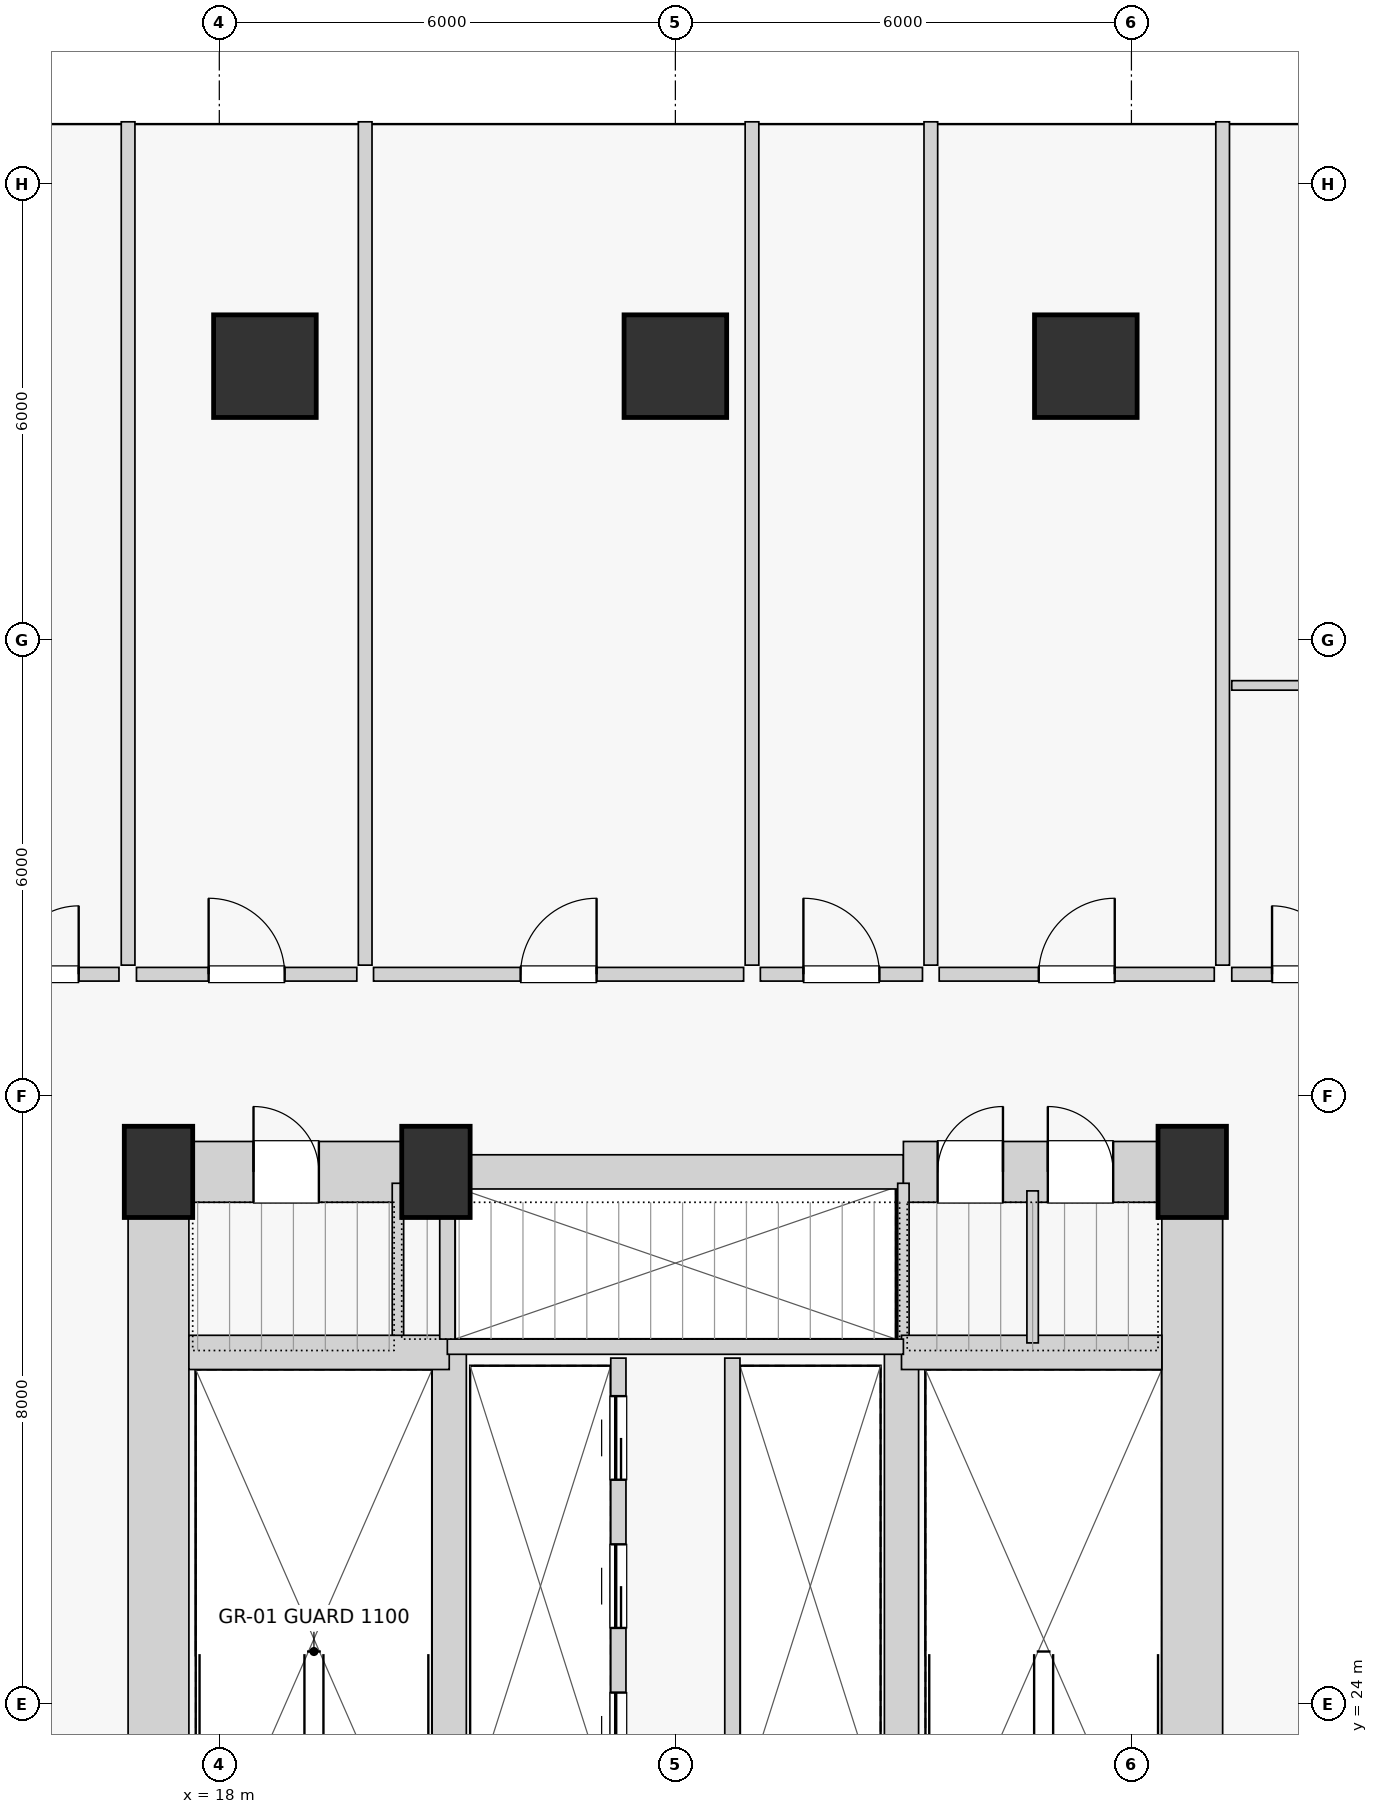
"""IFC4 building model, lengths in metres.
Left out: names, types, materials, properties, quantities, classifications, styles, units other than length and angle.
Written with IfcOpenShell. Run it as: python <this file> out.ifc"""

import sys

from ifc_helpers import new_model, si_unit, direction, frame, frame_2d, origin, origin_2d, place, context, subcontext, project, spatial, rectangle, extrude, source, transform, mapped, element, fill, save


model = new_model("IFC4")
c1 = context("Model", 3, precision=1e-05, world=origin(), true_north=direction((0.0, 1.0)))
c2 = subcontext(c1, "Body", "Model", "MODEL_VIEW")
j1 = project(units=[si_unit("LENGTHUNIT", "METRE"), si_unit("PLANEANGLEUNIT", "RADIAN")], contexts=[c1])
p1 = place(None, origin())
s1 = spatial("IfcSite", under=j1, at=p1, CompositionType="ELEMENT")
p2 = place(p1, origin())
s2 = spatial("IfcBuilding", under=s1, at=p2, CompositionType="ELEMENT")
p3 = place(p2, frame((0.0, 0.0, 22.8)))
s3 = spatial("IfcBuildingStorey", under=s2, at=p3, CompositionType="ELEMENT", Elevation=22.8)
for number, where, z_axis, x_axis in (
    (1, (17.2, 31.0, 0.0), (0.0, 0.0, 1.0), (1.0, 0.0, 0.0)),
    (2, (20.85, 31.0, 0.0), (0.0, 0.0, 1.0), (1.0, 0.0, 0.0)),
    (3, (30.8, 31.0, 0.0), (0.0, 0.0, 1.0), (1.0, 0.0, 0.0)),
):
    element("IfcColumn", number, at=place(p3, frame(where, z_axis=z_axis, x_axis=x_axis)), inside=s3, PredefinedType="PILASTER", context=c2, shape_type="SweptSolid", body=[
        extrude(rectangle(XDim=0.9, YDim=1.2, at=origin_2d()), origin(), (0.0, 0.0, 1.0), 4.5),
    ])
p4 = place(p3, frame((29.4, 41.6, 0.0), z_axis=(0.0, 0.0, 1.0), x_axis=(1.0, 0.0, 0.0)))
e4 = element("IfcColumn", 4, at=p4, inside=s3, PredefinedType="COLUMN", context=c2, shape_type="SweptSolid", body=[
    extrude(rectangle(XDim=1.35, YDim=1.35, at=origin_2d()), origin(), (0.0, 0.0, 1.0), 4.5),
])
p5 = place(p3, frame((24.0, 41.6, -0.35), z_axis=(0.0, 0.0, 1.0), x_axis=(1.0, 0.0, 0.0)))
e5 = element("IfcColumn", 5, at=p5, inside=s3, PredefinedType="COLUMN", context=c2, shape_type="SweptSolid", body=[
    extrude(rectangle(XDim=1.35, YDim=1.35, at=origin_2d()), origin(), (0.0, 0.0, 1.0), 4.85),
])
p6 = place(p3, frame((18.6, 41.6, 0.0), z_axis=(0.0, 0.0, 1.0), x_axis=(1.0, 0.0, 0.0)))
e6 = element("IfcColumn", 6, at=p6, inside=s3, PredefinedType="COLUMN", context=c2, shape_type="SweptSolid", body=[
    extrude(rectangle(XDim=1.35, YDim=1.35, at=origin_2d()), origin(), (0.0, 0.0, 1.0), 4.5),
])
for number, where, z_axis, x_axis in (
    (7, (17.2, 16.8, 0.0), (0.0, 0.0, 1.0), (0.0, 1.0, 0.0)),
    (8, (30.8, 16.8, 0.0), (0.0, 0.0, 1.0), (0.0, 1.0, 0.0)),
):
    element("IfcWall", number, at=place(p3, frame(where, z_axis=z_axis, x_axis=x_axis)), inside=s3, PredefinedType="SHEAR", context=c2, shape_type="SweptSolid", body=[
        extrude(rectangle(XDim=14.2, YDim=0.8, at=frame_2d((7.1, 0.0))), origin(), (0.0, 0.0, 1.0), 4.25),
    ])
p7 = place(p3, frame((17.2, 31.0, 0.0), z_axis=(0.0, 0.0, 1.0), x_axis=(1.0, 0.0, 0.0)))
e9 = element("IfcWall", 9, at=p7, inside=s3, PredefinedType="SHEAR", context=c2, shape_type="SweptSolid", body=[
    extrude(rectangle(XDim=3.8, YDim=0.8, at=frame_2d((1.9, 0.0))), origin(), (0.0, 0.0, 1.0), 4.25),
])
p8 = place(p7, frame((1.25, 0.0, 0.0)))
e10 = element("IfcOpeningElement", 10, at=p8, cuts=e9, PredefinedType="OPENING", context=c2, shape_type="SweptSolid", body=[
    extrude(rectangle(XDim=0.86, YDim=2.01, at=frame_2d((0.43, 1.005))), frame((0.0, 0.41, 0.0), z_axis=(0.0, -1.0, 0.0), x_axis=(1.0, 0.0, 0.0)), (0.0, 0.0, 1.0), 0.82),
])
p9 = place(p3, frame((21.0, 31.0, 0.0), z_axis=(0.0, 0.0, 1.0), x_axis=(1.0, 0.0, 0.0)))
e11 = element("IfcWall", 11, at=p9, inside=s3, PredefinedType="SHEAR", context=c2, shape_type="SweptSolid", body=[
    extrude(rectangle(XDim=6.0, YDim=0.45, at=frame_2d((3.0, 0.0))), origin(), (0.0, 0.0, 1.0), 4.25),
])
p10 = place(p3, frame((27.0, 31.0, 0.0), z_axis=(0.0, 0.0, 1.0), x_axis=(1.0, 0.0, 0.0)))
e12 = element("IfcWall", 12, at=p10, inside=s3, PredefinedType="SHEAR", context=c2, shape_type="SweptSolid", body=[
    extrude(rectangle(XDim=3.8, YDim=0.8, at=frame_2d((1.9, 0.0))), origin(), (0.0, 0.0, 1.0), 4.25),
])
p11 = place(p10, frame((0.45, 0.0, 0.0)))
e13 = element("IfcOpeningElement", 13, at=p11, cuts=e12, PredefinedType="OPENING", context=c2, shape_type="SweptSolid", body=[
    extrude(rectangle(XDim=0.86, YDim=2.01, at=frame_2d((0.43, 1.005))), frame((0.0, 0.41, 0.0), z_axis=(0.0, -1.0, 0.0), x_axis=(1.0, 0.0, 0.0)), (0.0, 0.0, 1.0), 0.82),
])
p12 = place(p10, frame((1.9, 0.0, 0.0)))
e14 = element("IfcOpeningElement", 14, at=p12, cuts=e12, PredefinedType="OPENING", context=c2, shape_type="SweptSolid", body=[
    extrude(rectangle(XDim=0.86, YDim=2.01, at=frame_2d((0.43, 1.005))), frame((0.0, 0.41, 0.0), z_axis=(0.0, -1.0, 0.0), x_axis=(1.0, 0.0, 0.0)), (0.0, 0.0, 1.0), 0.82),
])
for number, where, z_axis, x_axis in (
    (15, (20.35, 28.65, 0.0), (0.0, 0.0, 1.0), (0.0, 1.0, 0.0)),
    (16, (27.0, 28.65, 0.0), (0.0, 0.0, 1.0), (0.0, 1.0, 0.0)),
):
    element("IfcWall", number, at=place(p3, frame(where, z_axis=z_axis, x_axis=x_axis)), inside=s3, PredefinedType="PARTITIONING", context=c2, shape_type="SweptSolid", body=[
        extrude(rectangle(XDim=2.2, YDim=0.15, at=frame_2d((1.1, 0.0))), origin(), (0.0, 0.0, 1.0), 4.25),
    ])
for number, where, z_axis, x_axis in (
    (17, (21.025, 19.8, 0.0), (0.0, 0.0, 1.0), (0.0, 1.0, 0.0)),
    (18, (26.975, 19.8, 0.0), (0.0, 0.0, 1.0), (0.0, 1.0, 0.0)),
):
    element("IfcWall", number, at=place(p3, frame(where, z_axis=z_axis, x_axis=x_axis)), inside=s3, PredefinedType="SHEAR", context=c2, shape_type="SweptSolid", body=[
        extrude(rectangle(XDim=8.825, YDim=0.45, at=frame_2d((4.413, 0.0))), origin(), (0.0, 0.0, 1.0), 4.25),
    ])
for number, where, z_axis, x_axis in (
    (19, (17.6, 28.625, 0.0), (0.0, 0.0, 1.0), (1.0, 0.0, 0.0)),
    (20, (26.975, 28.625, 0.0), (0.0, 0.0, 1.0), (1.0, 0.0, 0.0)),
):
    element("IfcWall", number, at=place(p3, frame(where, z_axis=z_axis, x_axis=x_axis)), inside=s3, PredefinedType="SHEAR", context=c2, shape_type="SweptSolid", body=[
        extrude(rectangle(XDim=3.425, YDim=0.45, at=frame_2d((1.712, 0.0))), origin(), (0.0, 0.0, 1.0), 4.25),
    ])
p13 = place(p3, frame((21.0, 28.7, 0.0), z_axis=(0.0, 0.0, 1.0), x_axis=(1.0, 0.0, 0.0)))
e21 = element("IfcWall", 21, at=p13, inside=s3, PredefinedType="SOLIDWALL", context=c2, shape_type="SweptSolid", body=[
    extrude(rectangle(XDim=6.0, YDim=0.2, at=frame_2d((3.0, 0.0))), origin(), (0.0, 0.0, 1.0), 4.25),
])
p14 = place(p3, frame((21.0, 28.8, 0.0), z_axis=(0.0, 0.0, 1.0), x_axis=(0.0, 1.0, 0.0)))
e22 = element("IfcWall", 22, at=p14, inside=s3, PredefinedType="SOLIDWALL", context=c2, shape_type="SweptSolid", body=[
    extrude(rectangle(XDim=1.6, YDim=0.2, at=frame_2d((0.8, 0.0))), origin(), (0.0, 0.0, 1.0), 4.25),
])
p15 = place(p3, frame((23.25, 22.6, 0.0), z_axis=(0.0, 0.0, 1.0), x_axis=(0.0, 1.0, 0.0)))
e23 = element("IfcWall", 23, at=p15, inside=s3, PredefinedType="SOLIDWALL", context=c2, shape_type="SweptSolid", body=[
    extrude(rectangle(XDim=5.95, YDim=0.2, at=frame_2d((2.975, 0.0))), origin(), (0.0, 0.0, 1.0), 4.25),
])
p16 = place(p15, frame((0.45, 0.0, 0.0)))
e24 = element("IfcOpeningElement", 24, at=p16, cuts=e23, PredefinedType="OPENING", context=c2, shape_type="SweptSolid", body=[
    extrude(rectangle(XDim=1.1, YDim=2.08, at=frame_2d((0.55, 1.04))), frame((0.0, 0.11, 0.0), z_axis=(0.0, -1.0, 0.0), x_axis=(1.0, 0.0, 0.0)), (0.0, 0.0, 1.0), 0.22),
])
p17 = place(p15, frame((2.4, 0.0, 0.0)))
e25 = element("IfcOpeningElement", 25, at=p17, cuts=e23, PredefinedType="OPENING", context=c2, shape_type="SweptSolid", body=[
    extrude(rectangle(XDim=1.1, YDim=2.08, at=frame_2d((0.55, 1.04))), frame((0.0, 0.11, 0.0), z_axis=(0.0, -1.0, 0.0), x_axis=(1.0, 0.0, 0.0)), (0.0, 0.0, 1.0), 0.22),
])
p18 = place(p15, frame((4.35, 0.0, 0.0)))
e26 = element("IfcOpeningElement", 26, at=p18, cuts=e23, PredefinedType="OPENING", context=c2, shape_type="SweptSolid", body=[
    extrude(rectangle(XDim=1.1, YDim=2.08, at=frame_2d((0.55, 1.04))), frame((0.0, 0.11, 0.0), z_axis=(0.0, -1.0, 0.0), x_axis=(1.0, 0.0, 0.0)), (0.0, 0.0, 1.0), 0.22),
])
p19 = place(p3, frame((24.75, 22.6, 0.0), z_axis=(0.0, 0.0, 1.0), x_axis=(0.0, 1.0, 0.0)))
e27 = element("IfcWall", 27, at=p19, inside=s3, PredefinedType="SOLIDWALL", context=c2, shape_type="SweptSolid", body=[
    extrude(rectangle(XDim=5.95, YDim=0.2, at=frame_2d((2.975, 0.0))), origin(), (0.0, 0.0, 1.0), 4.25),
])
p20 = place(p3, frame((28.7, 28.75, 0.0), z_axis=(0.0, 0.0, 1.0), x_axis=(0.0, 1.0, 0.0)))
e28 = element("IfcWall", 28, at=p20, inside=s3, PredefinedType="PARTITIONING", context=c2, shape_type="SweptSolid", body=[
    extrude(rectangle(XDim=2.0, YDim=0.15, at=frame_2d((1.0, 0.0))), origin(), (0.0, 0.0, 1.0), 4.25),
])
for number, where, z_axis, x_axis in (
    (29, (16.8, 33.72, 0.0), (0.0, 0.0, 1.0), (0.0, 1.0, 0.0)),
    (30, (31.2, 33.72, 0.0), (0.0, 0.0, 1.0), (0.0, 1.0, 0.0)),
):
    element("IfcWall", number, at=place(p3, frame(where, z_axis=z_axis, x_axis=x_axis)), inside=s3, PredefinedType="PARTITIONING", context=c2, shape_type="SweptSolid", body=[
        extrude(rectangle(XDim=11.095, YDim=0.18, at=frame_2d((5.547, 0.0))), origin(), (0.0, 0.0, 1.0), 4.25),
    ])
p21 = place(p3, frame((16.91, 33.6, 0.0), z_axis=(0.0, 0.0, 1.0), x_axis=(1.0, 0.0, 0.0)))
e31 = element("IfcWall", 31, at=p21, inside=s3, PredefinedType="PARTITIONING", context=c2, shape_type="SweptSolid", body=[
    extrude(rectangle(XDim=2.899, YDim=0.18, at=frame_2d((1.45, 0.0))), origin(), (0.0, 0.0, 1.0), 4.25),
])
p22 = place(p21, frame((0.949, 0.0, 0.0)))
e32 = element("IfcOpeningElement", 32, at=p22, cuts=e31, PredefinedType="OPENING", context=c2, shape_type="SweptSolid", body=[
    extrude(rectangle(XDim=1.0, YDim=2.01, at=frame_2d((0.5, 1.005))), frame((0.0, 0.1, 0.0), z_axis=(0.0, -1.0, 0.0), x_axis=(1.0, 0.0, 0.0)), (0.0, 0.0, 1.0), 0.2),
])
p23 = place(p3, frame((20.029, 33.6, 0.0), z_axis=(0.0, 0.0, 1.0), x_axis=(1.0, 0.0, 0.0)))
e33 = element("IfcWall", 33, at=p23, inside=s3, PredefinedType="PARTITIONING", context=c2, shape_type="SweptSolid", body=[
    extrude(rectangle(XDim=4.869, YDim=0.18, at=frame_2d((2.435, 0.0))), origin(), (0.0, 0.0, 1.0), 4.25),
])
p24 = place(p23, frame((1.935, 0.0, 0.0)))
e34 = element("IfcOpeningElement", 34, at=p24, cuts=e33, PredefinedType="OPENING", context=c2, shape_type="SweptSolid", body=[
    extrude(rectangle(XDim=1.0, YDim=2.01, at=frame_2d((0.5, 1.005))), frame((0.0, 0.1, 0.0), z_axis=(0.0, -1.0, 0.0), x_axis=(1.0, 0.0, 0.0)), (0.0, 0.0, 1.0), 0.2),
])
for number, where, z_axis, x_axis in (
    (35, (19.919, 33.72, 0.0), (0.0, 0.0, 1.0), (0.0, 1.0, 0.0)),
    (36, (25.008, 33.72, 0.0), (0.0, 0.0, 1.0), (0.0, 1.0, 0.0)),
):
    element("IfcWall", number, at=place(p3, frame(where, z_axis=z_axis, x_axis=x_axis)), inside=s3, PredefinedType="PARTITIONING", context=c2, shape_type="SweptSolid", body=[
        extrude(rectangle(XDim=11.095, YDim=0.18, at=frame_2d((5.547, 0.0))), origin(), (0.0, 0.0, 1.0), 4.25),
    ])
p25 = place(p3, frame((25.118, 33.6, 0.0), z_axis=(0.0, 0.0, 1.0), x_axis=(1.0, 0.0, 0.0)))
e37 = element("IfcWall", 37, at=p25, inside=s3, PredefinedType="PARTITIONING", context=c2, shape_type="SweptSolid", body=[
    extrude(rectangle(XDim=2.133, YDim=0.18, at=frame_2d((1.066, 0.0))), origin(), (0.0, 0.0, 1.0), 4.25),
])
p26 = place(p25, frame((0.566, 0.0, 0.0)))
e38 = element("IfcOpeningElement", 38, at=p26, cuts=e37, PredefinedType="OPENING", context=c2, shape_type="SweptSolid", body=[
    extrude(rectangle(XDim=1.0, YDim=2.01, at=frame_2d((0.5, 1.005))), frame((0.0, 0.1, 0.0), z_axis=(0.0, -1.0, 0.0), x_axis=(1.0, 0.0, 0.0)), (0.0, 0.0, 1.0), 0.2),
])
p27 = place(p3, frame((27.471, 33.6, 0.0), z_axis=(0.0, 0.0, 1.0), x_axis=(1.0, 0.0, 0.0)))
e39 = element("IfcWall", 39, at=p27, inside=s3, PredefinedType="PARTITIONING", context=c2, shape_type="SweptSolid", body=[
    extrude(rectangle(XDim=3.619, YDim=0.18, at=frame_2d((1.81, 0.0))), origin(), (0.0, 0.0, 1.0), 4.25),
])
p28 = place(p27, frame((1.31, 0.0, 0.0)))
e40 = element("IfcOpeningElement", 40, at=p28, cuts=e39, PredefinedType="OPENING", context=c2, shape_type="SweptSolid", body=[
    extrude(rectangle(XDim=1.0, YDim=2.01, at=frame_2d((0.5, 1.005))), frame((0.0, 0.1, 0.0), z_axis=(0.0, -1.0, 0.0), x_axis=(1.0, 0.0, 0.0)), (0.0, 0.0, 1.0), 0.2),
])
p29 = place(p3, frame((27.361, 33.72, 0.0), z_axis=(0.0, 0.0, 1.0), x_axis=(0.0, 1.0, 0.0)))
e41 = element("IfcWall", 41, at=p29, inside=s3, PredefinedType="PARTITIONING", context=c2, shape_type="SweptSolid", body=[
    extrude(rectangle(XDim=11.095, YDim=0.18, at=frame_2d((5.547, 0.0))), origin(), (0.0, 0.0, 1.0), 4.25),
])
p30 = place(p3, frame((14.72, 33.6, 0.0), z_axis=(0.0, 0.0, 1.0), x_axis=(1.0, 0.0, 0.0)))
e42 = element("IfcWall", 42, at=p30, inside=s3, PredefinedType="PARTITIONING", context=c2, shape_type="SweptSolid", body=[
    extrude(rectangle(XDim=1.96, YDim=0.18, at=frame_2d((0.98, 0.0))), origin(), (0.0, 0.0, 1.0), 4.25),
])
p31 = place(p30, frame((0.53, 0.0, 0.0)))
e43 = element("IfcOpeningElement", 43, at=p31, cuts=e42, PredefinedType="OPENING", context=c2, shape_type="SweptSolid", body=[
    extrude(rectangle(XDim=0.9, YDim=2.01, at=frame_2d((0.45, 1.005))), frame((0.0, 0.1, 0.0), z_axis=(0.0, -1.0, 0.0), x_axis=(1.0, 0.0, 0.0)), (0.0, 0.0, 1.0), 0.2),
])
p32 = place(p3, frame((31.32, 33.6, 0.0), z_axis=(0.0, 0.0, 1.0), x_axis=(1.0, 0.0, 0.0)))
e44 = element("IfcWall", 44, at=p32, inside=s3, PredefinedType="PARTITIONING", context=c2, shape_type="SweptSolid", body=[
    extrude(rectangle(XDim=1.96, YDim=0.18, at=frame_2d((0.98, 0.0))), origin(), (0.0, 0.0, 1.0), 4.25),
])
p33 = place(p32, frame((0.53, 0.0, 0.0)))
e45 = element("IfcOpeningElement", 45, at=p33, cuts=e44, PredefinedType="OPENING", context=c2, shape_type="SweptSolid", body=[
    extrude(rectangle(XDim=0.9, YDim=2.01, at=frame_2d((0.45, 1.005))), frame((0.0, 0.1, 0.0), z_axis=(0.0, -1.0, 0.0), x_axis=(1.0, 0.0, 0.0)), (0.0, 0.0, 1.0), 0.2),
])
p34 = place(p3, frame((31.32, 37.4, 0.0), z_axis=(0.0, 0.0, 1.0), x_axis=(1.0, 0.0, 0.0)))
e46 = element("IfcWall", 46, at=p34, inside=s3, PredefinedType="PARTITIONING", context=c2, shape_type="SweptSolid", body=[
    extrude(rectangle(XDim=8.978, YDim=0.125, at=frame_2d((4.489, 0.0))), origin(), (0.0, 0.0, 1.0), 4.25),
])
p35 = place(p34, frame((4.059, 0.0, 0.0)))
e47 = element("IfcOpeningElement", 47, at=p35, cuts=e46, PredefinedType="OPENING", context=c2, shape_type="SweptSolid", body=[
    extrude(rectangle(XDim=0.86, YDim=2.01, at=frame_2d((0.43, 1.005))), frame((0.0, 0.073, 0.0), z_axis=(0.0, -1.0, 0.0), x_axis=(1.0, 0.0, 0.0)), (0.0, 0.0, 1.0), 0.145),
])
m1 = source(origin(), c2, "Body", "SweptSolid", [
    extrude(rectangle(XDim=0.86, YDim=2.01, at=frame_2d((0.43, 1.005))), frame((0.0, 0.025, 0.0), z_axis=(0.0, -1.0, 0.0), x_axis=(1.0, 0.0, 0.0)), (0.0, 0.0, 1.0), 0.05),
])
p36 = place(p8, origin())
e48 = element("IfcDoor", 48, at=p36, inside=s3, OperationType="SINGLE_SWING_LEFT", PredefinedType="DOOR", context=c2, shape_type="MappedRepresentation", body=[
    mapped(m1, transform((0.0, 0.0, 0.0), scale=1.0)),
])
fill(e10, e48)
p37 = place(p11, origin())
e49 = element("IfcDoor", 49, at=p37, inside=s3, OperationType="SINGLE_SWING_RIGHT", PredefinedType="DOOR", context=c2, shape_type="MappedRepresentation", body=[
    mapped(m1, transform((0.0, 0.0, 0.0), scale=1.0)),
])
fill(e13, e49)
p38 = place(p12, origin())
e50 = element("IfcDoor", 50, at=p38, inside=s3, OperationType="SINGLE_SWING_LEFT", PredefinedType="DOOR", context=c2, shape_type="MappedRepresentation", body=[
    mapped(m1, transform((0.0, 0.0, 0.0), scale=1.0)),
])
fill(e14, e50)
m2 = source(origin(), c2, "Body", "SweptSolid", [
    extrude(rectangle(XDim=1.1, YDim=2.08, at=frame_2d((0.55, 1.04))), frame((0.0, 0.025, 0.0), z_axis=(0.0, -1.0, 0.0), x_axis=(1.0, 0.0, 0.0)), (0.0, 0.0, 1.0), 0.05),
])
p39 = place(p16, origin())
e51 = element("IfcDoor", 51, at=p39, inside=s3, OperationType="SLIDING_TO_LEFT", PredefinedType="DOOR", context=c2, shape_type="MappedRepresentation", body=[
    mapped(m2, transform((0.0, 0.0, 0.0), scale=1.0)),
])
fill(e24, e51)
p40 = place(p17, origin())
e52 = element("IfcDoor", 52, at=p40, inside=s3, OperationType="SLIDING_TO_LEFT", PredefinedType="DOOR", context=c2, shape_type="MappedRepresentation", body=[
    mapped(m2, transform((0.0, 0.0, 0.0), scale=1.0)),
])
fill(e25, e52)
p41 = place(p18, origin())
e53 = element("IfcDoor", 53, at=p41, inside=s3, OperationType="SLIDING_TO_LEFT", PredefinedType="DOOR", context=c2, shape_type="MappedRepresentation", body=[
    mapped(m2, transform((0.0, 0.0, 0.0), scale=1.0)),
])
fill(e26, e53)
m3 = source(origin(), c2, "Body", "SweptSolid", [
    extrude(rectangle(XDim=1.0, YDim=2.01, at=frame_2d((0.5, 1.005))), frame((0.0, 0.025, 0.0), z_axis=(0.0, -1.0, 0.0), x_axis=(1.0, 0.0, 0.0)), (0.0, 0.0, 1.0), 0.05),
])
p42 = place(p22, origin())
e54 = element("IfcDoor", 54, at=p42, inside=s3, OperationType="SINGLE_SWING_LEFT", PredefinedType="DOOR", context=c2, shape_type="MappedRepresentation", body=[
    mapped(m3, transform((0.0, 0.0, 0.0), scale=1.0)),
])
fill(e32, e54)
p43 = place(p24, origin())
e55 = element("IfcDoor", 55, at=p43, inside=s3, OperationType="SINGLE_SWING_RIGHT", PredefinedType="DOOR", context=c2, shape_type="MappedRepresentation", body=[
    mapped(m3, transform((0.0, 0.0, 0.0), scale=1.0)),
])
fill(e34, e55)
p44 = place(p26, origin())
e56 = element("IfcDoor", 56, at=p44, inside=s3, OperationType="SINGLE_SWING_LEFT", PredefinedType="DOOR", context=c2, shape_type="MappedRepresentation", body=[
    mapped(m3, transform((0.0, 0.0, 0.0), scale=1.0)),
])
fill(e38, e56)
p45 = place(p28, origin())
e57 = element("IfcDoor", 57, at=p45, inside=s3, OperationType="SINGLE_SWING_RIGHT", PredefinedType="DOOR", context=c2, shape_type="MappedRepresentation", body=[
    mapped(m3, transform((0.0, 0.0, 0.0), scale=1.0)),
])
fill(e40, e57)
m4 = source(origin(), c2, "Body", "SweptSolid", [
    extrude(rectangle(XDim=0.9, YDim=2.01, at=frame_2d((0.45, 1.005))), frame((0.0, 0.025, 0.0), z_axis=(0.0, -1.0, 0.0), x_axis=(1.0, 0.0, 0.0)), (0.0, 0.0, 1.0), 0.05),
])
p46 = place(p31, origin())
e58 = element("IfcDoor", 58, at=p46, inside=s3, OperationType="SINGLE_SWING_RIGHT", PredefinedType="DOOR", context=c2, shape_type="MappedRepresentation", body=[
    mapped(m4, transform((0.0, 0.0, 0.0), scale=1.0)),
])
fill(e43, e58)
p47 = place(p33, origin())
e59 = element("IfcDoor", 59, at=p47, inside=s3, OperationType="SINGLE_SWING_LEFT", PredefinedType="DOOR", context=c2, shape_type="MappedRepresentation", body=[
    mapped(m4, transform((0.0, 0.0, 0.0), scale=1.0)),
])
fill(e45, e59)
save(model, sys.argv[1])
